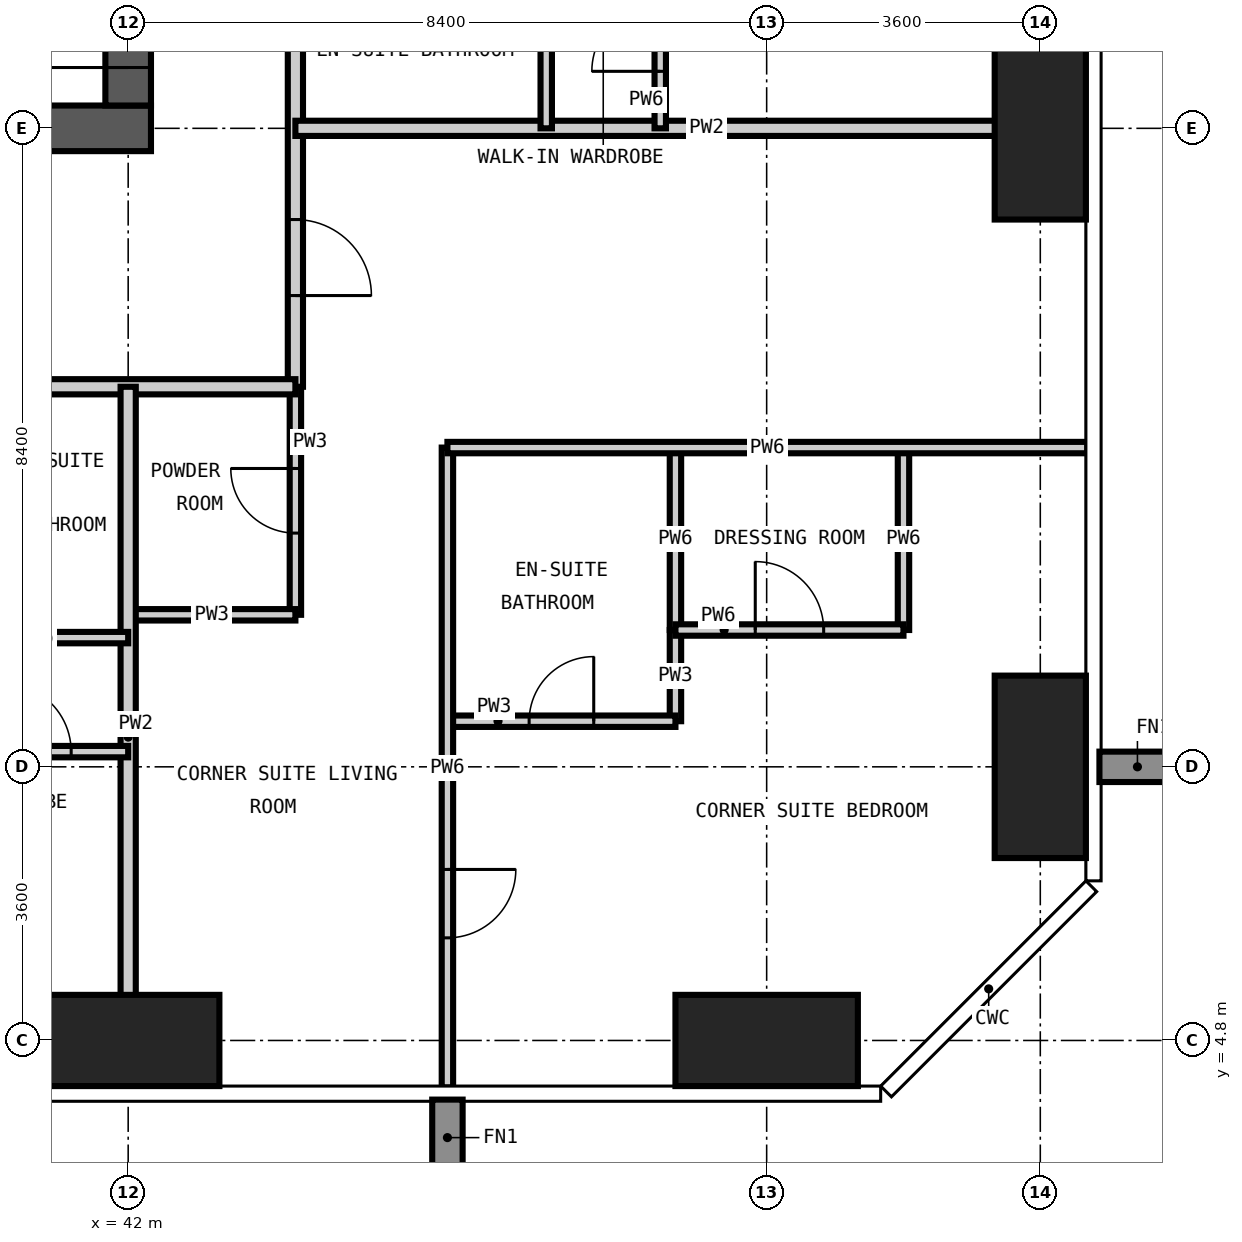
"""IFC4 building model, lengths in metres.
Left out: names, types, materials, properties, quantities, classifications, styles, units other than length and angle.
Written with IfcOpenShell. Run it as: python <this file> out.ifc"""

import sys

from ifc_helpers import new_model, si_unit, direction, frame, frame_2d, origin, origin_2d, place, context, subcontext, project, spatial, rectangle, extrude, element, fill, save


model = new_model("IFC4")
c1 = context("Model", 3, precision=1e-05, world=origin(), true_north=direction((0.0, 1.0)))
c2 = subcontext(c1, "Body", "Model", "MODEL_VIEW")
j1 = project(units=[si_unit("LENGTHUNIT", "METRE"), si_unit("PLANEANGLEUNIT", "RADIAN")], contexts=[c1])
p1 = place(None, origin())
s1 = spatial("IfcSite", under=j1, at=p1, CompositionType="ELEMENT")
p2 = place(p1, origin())
s2 = spatial("IfcBuilding", under=s1, at=p2, CompositionType="ELEMENT")
p3 = place(p2, frame((0.0, 0.0, 198.6)))
s3 = spatial("IfcBuildingStorey", under=s2, at=p3, CompositionType="ELEMENT", Elevation=198.6)
for number, where, z_axis, x_axis in (
    (1, (42.0, 4.8, -0.35), (0.0, 0.0, 1.0), (1.0, 0.0, 0.0)),
    (2, (50.4, 4.8, -0.35), (0.0, 0.0, 1.0), (1.0, 0.0, 0.0)),
):
    element("IfcColumn", number, at=place(p3, frame(where, z_axis=z_axis, x_axis=x_axis)), inside=s3, PredefinedType="COLUMN", context=c2, shape_type="SweptSolid", body=[
        extrude(rectangle(XDim=2.4, YDim=1.2, at=origin_2d()), origin(), (0.0, 0.0, 1.0), 3.6),
    ])
for number, where, z_axis, x_axis in (
    (3, (54.0, 8.4, -0.35), (0.0, 0.0, 1.0), (1.0, 0.0, 0.0)),
    (4, (54.0, 16.8, -0.35), (0.0, 0.0, 1.0), (1.0, 0.0, 0.0)),
):
    element("IfcColumn", number, at=place(p3, frame(where, z_axis=z_axis, x_axis=x_axis)), inside=s3, PredefinedType="COLUMN", context=c2, shape_type="SweptSolid", body=[
        extrude(rectangle(XDim=1.2, YDim=2.4, at=origin_2d()), origin(), (0.0, 0.0, 1.0), 3.6),
    ])
p4 = place(p3, frame((16.5, 16.8, -0.35), z_axis=(0.0, 0.0, 1.0), x_axis=(1.0, 0.0, 0.0)))
e5 = element("IfcWall", 5, at=p4, inside=s3, PredefinedType="SHEAR", context=c2, shape_type="SweptSolid", body=[
    extrude(rectangle(XDim=25.8, YDim=0.6, at=frame_2d((12.9, 0.0))), origin(), (0.0, 0.0, 1.0), 3.6),
])
p5 = place(p4, frame((12.4, 0.0, 0.35)))
e6 = element("IfcOpeningElement", 6, at=p5, cuts=e5, PredefinedType="OPENING", context=c2, shape_type="SweptSolid", body=[
    extrude(rectangle(XDim=1.0, YDim=2.1, at=frame_2d((0.5, 1.05))), frame((0.0, 0.31, 0.0), z_axis=(0.0, -1.0, 0.0), x_axis=(1.0, 0.0, 0.0)), (0.0, 0.0, 1.0), 0.62),
])
p6 = place(p4, frame((18.7, 0.0, 0.35)))
e7 = element("IfcOpeningElement", 7, at=p6, cuts=e5, PredefinedType="OPENING", context=c2, shape_type="SweptSolid", body=[
    extrude(rectangle(XDim=1.0, YDim=2.1, at=frame_2d((0.5, 1.05))), frame((0.0, 0.31, 0.0), z_axis=(0.0, -1.0, 0.0), x_axis=(1.0, 0.0, 0.0)), (0.0, 0.0, 1.0), 0.62),
])
p7 = place(p3, frame((42.0, 17.1, -0.35), z_axis=(0.0, 0.0, 1.0), x_axis=(0.0, 1.0, 0.0)))
e8 = element("IfcWall", 8, at=p7, inside=s3, PredefinedType="SHEAR", context=c2, shape_type="SweptSolid", body=[
    extrude(rectangle(XDim=24.6, YDim=0.6, at=frame_2d((12.3, 0.0))), origin(), (0.0, 0.0, 1.0), 3.6),
])
p8 = place(p7, frame((0.5, 0.0, 0.35)))
e9 = element("IfcOpeningElement", 9, at=p8, cuts=e8, PredefinedType="OPENING", context=c2, shape_type="SweptSolid", body=[
    extrude(rectangle(XDim=1.2, YDim=2.2, at=frame_2d((0.6, 1.1))), frame((0.0, 0.31, 0.0), z_axis=(0.0, -1.0, 0.0), x_axis=(1.0, 0.0, 0.0)), (0.0, 0.0, 1.0), 0.62),
])
p9 = place(p7, frame((11.8, 0.0, 0.35)))
e10 = element("IfcOpeningElement", 10, at=p9, cuts=e8, PredefinedType="OPENING", context=c2, shape_type="SweptSolid", body=[
    extrude(rectangle(XDim=1.0, YDim=2.1, at=frame_2d((0.5, 1.05))), frame((0.0, 0.31, 0.0), z_axis=(0.0, -1.0, 0.0), x_axis=(1.0, 0.0, 0.0)), (0.0, 0.0, 1.0), 0.62),
])
p10 = place(p7, frame((20.2, 0.0, 0.35)))
e11 = element("IfcOpeningElement", 11, at=p10, cuts=e8, PredefinedType="OPENING", context=c2, shape_type="SweptSolid", body=[
    extrude(rectangle(XDim=1.0, YDim=2.1, at=frame_2d((0.5, 1.05))), frame((0.0, 0.31, 0.0), z_axis=(0.0, -1.0, 0.0), x_axis=(1.0, 0.0, 0.0)), (0.0, 0.0, 1.0), 0.62),
])
p11 = place(p3, frame((44.2, 10.4, 0.0), z_axis=(0.0, 0.0, 1.0), x_axis=(0.0, 1.0, 0.0)))
e12 = element("IfcWall", 12, at=p11, inside=s3, PredefinedType="PARTITIONING", context=c2, shape_type="SweptSolid", body=[
    extrude(rectangle(XDim=3.0, YDim=0.15, at=frame_2d((1.5, 0.0))), origin(), (0.0, 0.0, 1.0), 3.25),
])
p12 = place(p11, frame((1.075, 0.0, 0.0)))
e13 = element("IfcOpeningElement", 13, at=p12, cuts=e12, PredefinedType="OPENING", context=c2, shape_type="SweptSolid", body=[
    extrude(rectangle(XDim=0.85, YDim=2.1, at=frame_2d((0.425, 1.05))), frame((0.0, 0.085, 0.0), z_axis=(0.0, -1.0, 0.0), x_axis=(1.0, 0.0, 0.0)), (0.0, 0.0, 1.0), 0.17),
])
p13 = place(p3, frame((49.2, 9.0, 0.0), z_axis=(0.0, 0.0, 1.0), x_axis=(0.0, 1.0, 0.0)))
e14 = element("IfcWall", 14, at=p13, inside=s3, PredefinedType="PARTITIONING", context=c2, shape_type="SweptSolid", body=[
    extrude(rectangle(XDim=1.2, YDim=0.15, at=frame_2d((0.6, 0.0))), origin(), (0.0, 0.0, 1.0), 3.25),
])
p14 = place(p3, frame((46.2, 9.0, 0.0), z_axis=(0.0, 0.0, 1.0), x_axis=(1.0, 0.0, 0.0)))
e15 = element("IfcWall", 15, at=p14, inside=s3, PredefinedType="PARTITIONING", context=c2, shape_type="SweptSolid", body=[
    extrude(rectangle(XDim=3.0, YDim=0.15, at=frame_2d((1.5, 0.0))), origin(), (0.0, 0.0, 1.0), 3.25),
])
p15 = place(p14, frame((1.075, 0.0, 0.0)))
e16 = element("IfcOpeningElement", 16, at=p15, cuts=e15, PredefinedType="OPENING", context=c2, shape_type="SweptSolid", body=[
    extrude(rectangle(XDim=0.85, YDim=2.1, at=frame_2d((0.425, 1.05))), frame((0.0, 0.085, 0.0), z_axis=(0.0, -1.0, 0.0), x_axis=(1.0, 0.0, 0.0)), (0.0, 0.0, 1.0), 0.17),
])
p16 = place(p3, frame((42.0, 10.4, 0.0), z_axis=(0.0, 0.0, 1.0), x_axis=(1.0, 0.0, 0.0)))
e17 = element("IfcWall", 17, at=p16, inside=s3, PredefinedType="PARTITIONING", context=c2, shape_type="SweptSolid", body=[
    extrude(rectangle(XDim=2.2, YDim=0.15, at=frame_2d((1.1, 0.0))), origin(), (0.0, 0.0, 1.0), 3.25),
])
p17 = place(p3, frame((44.2, 44.8, 0.0), z_axis=(0.0, 0.0, 1.0), x_axis=(0.0, -1.0, 0.0)))
e18 = element("IfcWall", 18, at=p17, inside=s3, PredefinedType="PARTITIONING", context=c2, shape_type="SweptSolid", body=[
    extrude(rectangle(XDim=31.4, YDim=0.2, at=frame_2d((15.7, 0.0))), origin(), (0.0, 0.0, 1.0), 3.25),
])
p18 = place(p17, frame((21.2, 0.0, 0.0)))
e19 = element("IfcOpeningElement", 19, at=p18, cuts=e18, PredefinedType="OPENING", context=c2, shape_type="SweptSolid", body=[
    extrude(rectangle(XDim=1.0, YDim=2.2, at=frame_2d((0.5, 1.1))), frame((0.0, 0.11, 0.0), z_axis=(0.0, -1.0, 0.0), x_axis=(1.0, 0.0, 0.0)), (0.0, 0.0, 1.0), 0.22),
])
p19 = place(p17, frame((8.6, 0.0, 0.0)))
e20 = element("IfcOpeningElement", 20, at=p19, cuts=e18, PredefinedType="OPENING", context=c2, shape_type="SweptSolid", body=[
    extrude(rectangle(XDim=1.0, YDim=2.2, at=frame_2d((0.5, 1.1))), frame((0.0, 0.11, 0.0), z_axis=(0.0, -1.0, 0.0), x_axis=(1.0, 0.0, 0.0)), (0.0, 0.0, 1.0), 0.22),
])
p20 = place(p17, frame((29.2, 0.0, 0.0)))
e21 = element("IfcOpeningElement", 21, at=p20, cuts=e18, PredefinedType="OPENING", context=c2, shape_type="SweptSolid", body=[
    extrude(rectangle(XDim=1.0, YDim=2.2, at=frame_2d((0.5, 1.1))), frame((0.0, 0.11, 0.0), z_axis=(0.0, -1.0, 0.0), x_axis=(1.0, 0.0, 0.0)), (0.0, 0.0, 1.0), 0.22),
])
p21 = place(p17, frame((0.9, 0.0, 0.0)))
e22 = element("IfcOpeningElement", 22, at=p21, cuts=e18, PredefinedType="OPENING", context=c2, shape_type="SweptSolid", body=[
    extrude(rectangle(XDim=1.0, YDim=2.2, at=frame_2d((0.5, 1.1))), frame((0.0, 0.11, 0.0), z_axis=(0.0, -1.0, 0.0), x_axis=(1.0, 0.0, 0.0)), (0.0, 0.0, 1.0), 0.22),
])
p22 = place(p3, frame((44.2, 13.4, 0.0), z_axis=(0.0, 0.0, 1.0), x_axis=(-1.0, 0.0, 0.0)))
e23 = element("IfcWall", 23, at=p22, inside=s3, PredefinedType="PARTITIONING", context=c2, shape_type="SweptSolid", body=[
    extrude(rectangle(XDim=30.8, YDim=0.2, at=frame_2d((15.4, 0.0))), origin(), (0.0, 0.0, 1.0), 3.25),
])
p23 = place(p22, frame((23.6, 0.0, 0.0)))
e24 = element("IfcOpeningElement", 24, at=p23, cuts=e23, PredefinedType="OPENING", context=c2, shape_type="SweptSolid", body=[
    extrude(rectangle(XDim=1.0, YDim=2.2, at=frame_2d((0.5, 1.1))), frame((0.0, 0.11, 0.0), z_axis=(0.0, -1.0, 0.0), x_axis=(1.0, 0.0, 0.0)), (0.0, 0.0, 1.0), 0.22),
])
p24 = place(p22, frame((21.8, 0.0, 0.0)))
e25 = element("IfcOpeningElement", 25, at=p24, cuts=e23, PredefinedType="OPENING", context=c2, shape_type="SweptSolid", body=[
    extrude(rectangle(XDim=1.0, YDim=2.2, at=frame_2d((0.5, 1.1))), frame((0.0, 0.11, 0.0), z_axis=(0.0, -1.0, 0.0), x_axis=(1.0, 0.0, 0.0)), (0.0, 0.0, 1.0), 0.22),
])
p25 = place(p22, frame((15.5, 0.0, 0.0)))
e26 = element("IfcOpeningElement", 26, at=p25, cuts=e23, PredefinedType="OPENING", context=c2, shape_type="SweptSolid", body=[
    extrude(rectangle(XDim=1.0, YDim=2.2, at=frame_2d((0.5, 1.1))), frame((0.0, 0.11, 0.0), z_axis=(0.0, -1.0, 0.0), x_axis=(1.0, 0.0, 0.0)), (0.0, 0.0, 1.0), 0.22),
])
p26 = place(p22, frame((5.0, 0.0, 0.0)))
e27 = element("IfcOpeningElement", 27, at=p26, cuts=e23, PredefinedType="OPENING", context=c2, shape_type="SweptSolid", body=[
    extrude(rectangle(XDim=1.0, YDim=2.2, at=frame_2d((0.5, 1.1))), frame((0.0, 0.11, 0.0), z_axis=(0.0, -1.0, 0.0), x_axis=(1.0, 0.0, 0.0)), (0.0, 0.0, 1.0), 0.22),
])
p27 = place(p3, frame((42.0, 4.182, 0.0), z_axis=(0.0, 0.0, 1.0), x_axis=(0.0, 1.0, 0.0)))
e28 = element("IfcWall", 28, at=p27, inside=s3, PredefinedType="PARTITIONING", context=c2, shape_type="SweptSolid", body=[
    extrude(rectangle(XDim=9.218, YDim=0.2, at=frame_2d((4.609, 0.0))), origin(), (0.0, 0.0, 1.0), 3.25),
])
p28 = place(p3, frame((44.2, 16.8, 0.0), z_axis=(0.0, 0.0, 1.0), x_axis=(1.0, 0.0, 0.0)))
e29 = element("IfcWall", 29, at=p28, inside=s3, PredefinedType="PARTITIONING", context=c2, shape_type="SweptSolid", body=[
    extrude(rectangle(XDim=10.418, YDim=0.2, at=frame_2d((5.209, 0.0))), origin(), (0.0, 0.0, 1.0), 3.25),
])
p29 = place(p3, frame((46.2, 4.182, 0.0), z_axis=(0.0, 0.0, 1.0), x_axis=(0.0, 1.0, 0.0)))
e30 = element("IfcWall", 30, at=p29, inside=s3, PredefinedType="PARTITIONING", context=c2, shape_type="SweptSolid", body=[
    extrude(rectangle(XDim=8.418, YDim=0.15, at=frame_2d((4.209, 0.0))), origin(), (0.0, 0.0, 1.0), 3.25),
])
p30 = place(p29, frame((1.968, 0.0, 0.0)))
e31 = element("IfcOpeningElement", 31, at=p30, cuts=e30, PredefinedType="OPENING", context=c2, shape_type="SweptSolid", body=[
    extrude(rectangle(XDim=0.9, YDim=2.1, at=frame_2d((0.45, 1.05))), frame((0.0, 0.085, 0.0), z_axis=(0.0, -1.0, 0.0), x_axis=(1.0, 0.0, 0.0)), (0.0, 0.0, 1.0), 0.17),
])
p31 = place(p3, frame((47.5, 16.8, 0.0), z_axis=(0.0, 0.0, 1.0), x_axis=(0.0, 1.0, 0.0)))
e32 = element("IfcWall", 32, at=p31, inside=s3, PredefinedType="PARTITIONING", context=c2, shape_type="SweptSolid", body=[
    extrude(rectangle(XDim=2.4, YDim=0.15, at=frame_2d((1.2, 0.0))), origin(), (0.0, 0.0, 1.0), 3.25),
])
p32 = place(p3, frame((49.0, 16.8, 0.0), z_axis=(0.0, 0.0, 1.0), x_axis=(0.0, 1.0, 0.0)))
e33 = element("IfcWall", 33, at=p32, inside=s3, PredefinedType="PARTITIONING", context=c2, shape_type="SweptSolid", body=[
    extrude(rectangle(XDim=2.4, YDim=0.15, at=frame_2d((1.2, 0.0))), origin(), (0.0, 0.0, 1.0), 3.25),
])
p33 = place(p32, frame((0.75, 0.0, 0.0)))
e34 = element("IfcOpeningElement", 34, at=p33, cuts=e33, PredefinedType="OPENING", context=c2, shape_type="SweptSolid", body=[
    extrude(rectangle(XDim=0.9, YDim=2.1, at=frame_2d((0.45, 1.05))), frame((0.0, 0.085, 0.0), z_axis=(0.0, -1.0, 0.0), x_axis=(1.0, 0.0, 0.0)), (0.0, 0.0, 1.0), 0.17),
])
for number, where, z_axis, x_axis in (
    (35, (49.2, 10.2, 0.0), (0.0, 0.0, 1.0), (0.0, 1.0, 0.0)),
    (36, (52.2, 10.2, 0.0), (0.0, 0.0, 1.0), (0.0, 1.0, 0.0)),
):
    element("IfcWall", number, at=place(p3, frame(where, z_axis=z_axis, x_axis=x_axis)), inside=s3, PredefinedType="PARTITIONING", context=c2, shape_type="SweptSolid", body=[
        extrude(rectangle(XDim=2.4, YDim=0.15, at=frame_2d((1.2, 0.0))), origin(), (0.0, 0.0, 1.0), 3.25),
    ])
p34 = place(p3, frame((39.6, 8.6, 0.0), z_axis=(0.0, 0.0, 1.0), x_axis=(1.0, 0.0, 0.0)))
e37 = element("IfcWall", 37, at=p34, inside=s3, PredefinedType="PARTITIONING", context=c2, shape_type="SweptSolid", body=[
    extrude(rectangle(XDim=2.4, YDim=0.15, at=frame_2d((1.2, 0.0))), origin(), (0.0, 0.0, 1.0), 3.25),
])
p35 = place(p34, frame((0.75, 0.0, 0.0)))
e38 = element("IfcOpeningElement", 38, at=p35, cuts=e37, PredefinedType="OPENING", context=c2, shape_type="SweptSolid", body=[
    extrude(rectangle(XDim=0.9, YDim=2.1, at=frame_2d((0.45, 1.05))), frame((0.0, 0.085, 0.0), z_axis=(0.0, -1.0, 0.0), x_axis=(1.0, 0.0, 0.0)), (0.0, 0.0, 1.0), 0.17),
])
p36 = place(p3, frame((39.6, 10.1, 0.0), z_axis=(0.0, 0.0, 1.0), x_axis=(1.0, 0.0, 0.0)))
e39 = element("IfcWall", 39, at=p36, inside=s3, PredefinedType="PARTITIONING", context=c2, shape_type="SweptSolid", body=[
    extrude(rectangle(XDim=2.4, YDim=0.15, at=frame_2d((1.2, 0.0))), origin(), (0.0, 0.0, 1.0), 3.25),
])
p37 = place(p3, frame((49.2, 10.2, 0.0), z_axis=(0.0, 0.0, 1.0), x_axis=(1.0, 0.0, 0.0)))
e40 = element("IfcWall", 40, at=p37, inside=s3, PredefinedType="PARTITIONING", context=c2, shape_type="SweptSolid", body=[
    extrude(rectangle(XDim=3.0, YDim=0.15, at=frame_2d((1.5, 0.0))), origin(), (0.0, 0.0, 1.0), 3.25),
])
p38 = place(p37, frame((1.05, 0.0, 0.0)))
e41 = element("IfcOpeningElement", 41, at=p38, cuts=e40, PredefinedType="OPENING", context=c2, shape_type="SweptSolid", body=[
    extrude(rectangle(XDim=0.9, YDim=2.1, at=frame_2d((0.45, 1.05))), frame((0.0, 0.085, 0.0), z_axis=(0.0, -1.0, 0.0), x_axis=(1.0, 0.0, 0.0)), (0.0, 0.0, 1.0), 0.17),
])
p39 = place(p3, frame((46.2, 12.6, 0.0), z_axis=(0.0, 0.0, 1.0), x_axis=(1.0, 0.0, 0.0)))
e42 = element("IfcWall", 42, at=p39, inside=s3, PredefinedType="PARTITIONING", context=c2, shape_type="SweptSolid", body=[
    extrude(rectangle(XDim=8.418, YDim=0.15, at=frame_2d((4.209, 0.0))), origin(), (0.0, 0.0, 1.0), 3.25),
])
p40 = place(p8, origin())
e43 = element("IfcDoor", 43, at=p40, inside=s3, OperationType="SINGLE_SWING_LEFT", PredefinedType="DOOR", context=c2, shape_type="SweptSolid", body=[
    extrude(rectangle(XDim=1.2, YDim=2.2, at=frame_2d((0.6, 1.1))), frame((0.0, 0.025, 0.0), z_axis=(0.0, -1.0, 0.0), x_axis=(1.0, 0.0, 0.0)), (0.0, 0.0, 1.0), 0.05),
])
fill(e9, e43)
p41 = place(p35, origin())
e44 = element("IfcDoor", 44, at=p41, inside=s3, OperationType="SINGLE_SWING_LEFT", PredefinedType="DOOR", context=c2, shape_type="SweptSolid", body=[
    extrude(rectangle(XDim=0.9, YDim=2.1, at=frame_2d((0.45, 1.05))), frame((0.0, 0.025, 0.0), z_axis=(0.0, -1.0, 0.0), x_axis=(1.0, 0.0, 0.0)), (0.0, 0.0, 1.0), 0.05),
])
fill(e38, e44)
p42 = place(p33, origin())
e45 = element("IfcDoor", 45, at=p42, inside=s3, OperationType="SINGLE_SWING_LEFT", PredefinedType="DOOR", context=c2, shape_type="SweptSolid", body=[
    extrude(rectangle(XDim=0.9, YDim=2.1, at=frame_2d((0.45, 1.05))), frame((0.0, 0.025, 0.0), z_axis=(0.0, -1.0, 0.0), x_axis=(1.0, 0.0, 0.0)), (0.0, 0.0, 1.0), 0.05),
])
fill(e34, e45)
p43 = place(p20, origin())
e46 = element("IfcDoor", 46, at=p43, inside=s3, OperationType="SINGLE_SWING_RIGHT", PredefinedType="DOOR", context=c2, shape_type="SweptSolid", body=[
    extrude(rectangle(XDim=1.0, YDim=2.2, at=frame_2d((0.5, 1.1))), frame((0.0, 0.025, 0.0), z_axis=(0.0, -1.0, 0.0), x_axis=(1.0, 0.0, 0.0)), (0.0, 0.0, 1.0), 0.05),
])
fill(e21, e46)
p44 = place(p12, origin())
e47 = element("IfcDoor", 47, at=p44, inside=s3, OperationType="SINGLE_SWING_RIGHT", PredefinedType="DOOR", context=c2, shape_type="SweptSolid", body=[
    extrude(rectangle(XDim=0.85, YDim=2.1, at=frame_2d((0.425, 1.05))), frame((0.0, 0.025, 0.0), z_axis=(0.0, -1.0, 0.0), x_axis=(1.0, 0.0, 0.0)), (0.0, 0.0, 1.0), 0.05),
])
fill(e13, e47)
p45 = place(p30, frame((0.9, 0.0, 0.0), z_axis=(0.0, 0.0, 1.0), x_axis=(-1.0, 0.0, 0.0)))
e48 = element("IfcDoor", 48, at=p45, inside=s3, OperationType="SINGLE_SWING_LEFT", PredefinedType="DOOR", context=c2, shape_type="SweptSolid", body=[
    extrude(rectangle(XDim=0.9, YDim=2.1, at=frame_2d((0.45, 1.05))), frame((0.0, 0.025, 0.0), z_axis=(0.0, -1.0, 0.0), x_axis=(1.0, 0.0, 0.0)), (0.0, 0.0, 1.0), 0.05),
])
fill(e31, e48)
p46 = place(p15, origin())
e49 = element("IfcDoor", 49, at=p46, inside=s3, OperationType="SINGLE_SWING_RIGHT", PredefinedType="DOOR", context=c2, shape_type="SweptSolid", body=[
    extrude(rectangle(XDim=0.85, YDim=2.1, at=frame_2d((0.425, 1.05))), frame((0.0, 0.025, 0.0), z_axis=(0.0, -1.0, 0.0), x_axis=(1.0, 0.0, 0.0)), (0.0, 0.0, 1.0), 0.05),
])
fill(e16, e49)
p47 = place(p38, origin())
e50 = element("IfcDoor", 50, at=p47, inside=s3, OperationType="SINGLE_SWING_LEFT", PredefinedType="DOOR", context=c2, shape_type="SweptSolid", body=[
    extrude(rectangle(XDim=0.9, YDim=2.1, at=frame_2d((0.45, 1.05))), frame((0.0, 0.025, 0.0), z_axis=(0.0, -1.0, 0.0), x_axis=(1.0, 0.0, 0.0)), (0.0, 0.0, 1.0), 0.05),
])
fill(e41, e50)
save(model, sys.argv[1])
